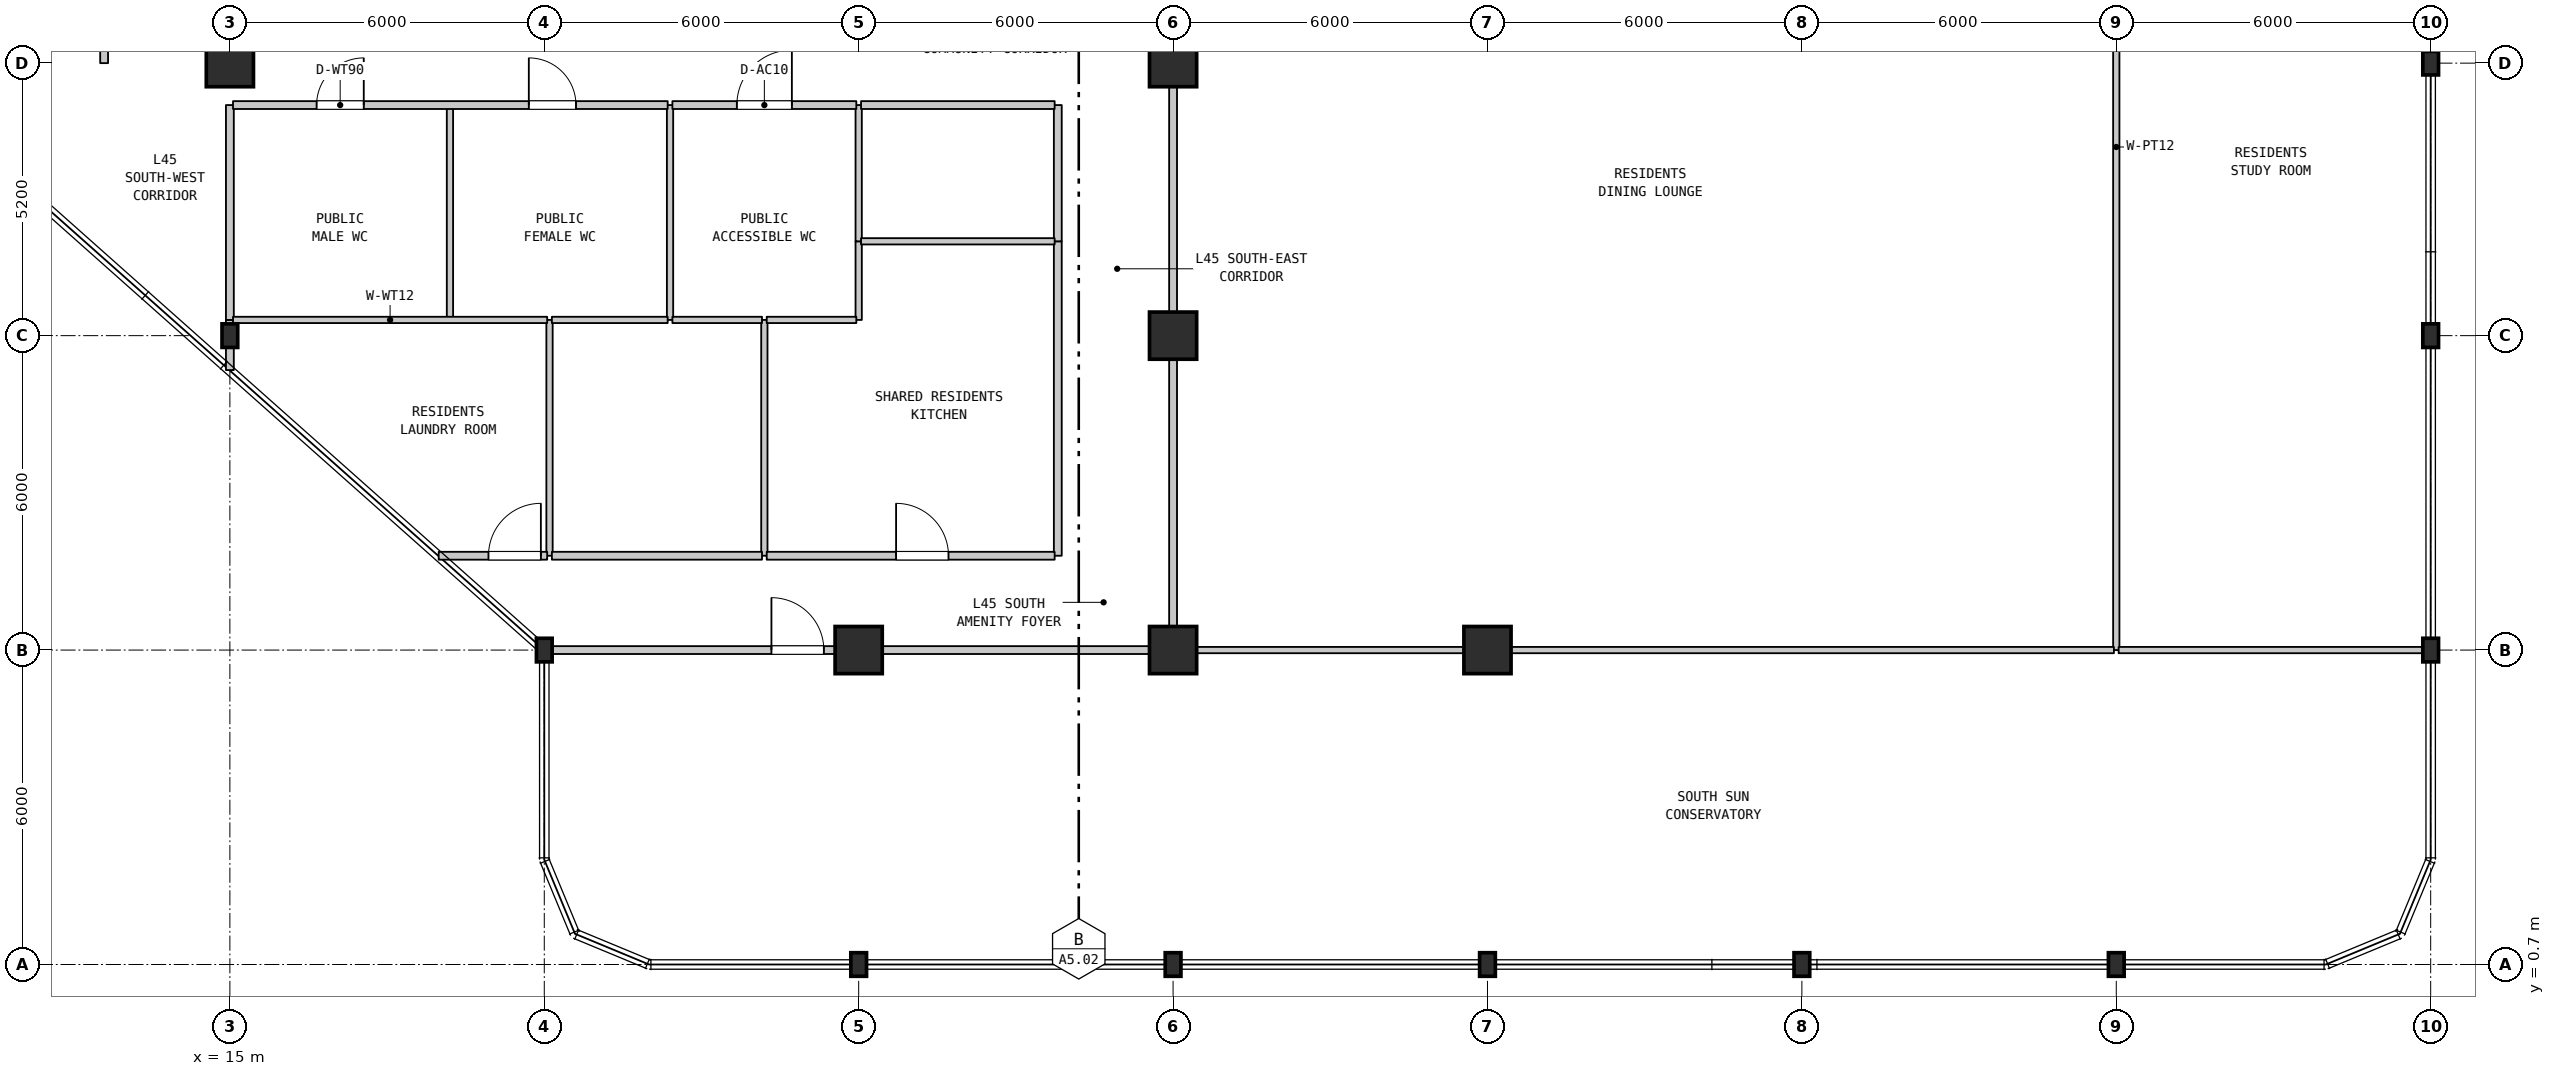
"""IFC4 building model, lengths in metres.
Left out: names, types, materials, properties, quantities, classifications, styles, units other than length and angle.
Written with IfcOpenShell. Run it as: python <this file> out.ifc"""

import sys

from ifc_helpers import new_model, si_unit, direction, frame, frame_2d, origin, origin_2d, place, context, subcontext, project, spatial, rectangle, i_section, extrude, element, fill, save


model = new_model("IFC4")
c1 = context("Model", 3, precision=1e-05, world=origin(), true_north=direction((0.0, 1.0)))
c2 = subcontext(c1, "Body", "Model", "MODEL_VIEW")
j1 = project(units=[si_unit("LENGTHUNIT", "METRE"), si_unit("PLANEANGLEUNIT", "RADIAN")], contexts=[c1])
p1 = place(None, origin())
s1 = spatial("IfcSite", under=j1, at=p1, CompositionType="ELEMENT")
p2 = place(p1, origin())
s2 = spatial("IfcBuilding", under=s1, at=p2, CompositionType="ELEMENT")
p3 = place(p2, frame((0.0, 0.0, 183.9)))
s3 = spatial("IfcBuildingStorey", under=s2, at=p3, CompositionType="ELEMENT", Elevation=183.9)
p4 = place(p3, frame((15.0, 12.7, 0.0), z_axis=(0.0, 0.0, 1.0), x_axis=(1.0, 0.0, 0.0)))
e1 = element("IfcColumn", 1, at=p4, inside=s3, PredefinedType="COLUMN", context=c2, shape_type="SweptSolid", body=[
    extrude(i_section(OverallWidth=0.3, OverallDepth=0.45, WebThickness=0.014, FlangeThickness=0.026, FilletRadius=0.027, at=origin_2d()), origin(), (0.0, 0.0, 1.0), 4.5),
])
p5 = place(p3, frame((15.0, 17.9, 0.0), z_axis=(0.0, 0.0, 1.0), x_axis=(1.0, 0.0, 0.0)))
e2 = element("IfcColumn", 2, at=p5, inside=s3, PredefinedType="COLUMN", context=c2, shape_type="SweptSolid", body=[
    extrude(rectangle(XDim=0.9, YDim=0.9, at=origin_2d()), origin(), (0.0, 0.0, 1.0), 4.5),
])
for number, where, z_axis, x_axis in (
    (3, (21.0, 6.7, 0.0), (0.0, 0.0, 1.0), (1.0, 0.0, 0.0)),
    (4, (27.0, 0.7, 0.0), (0.0, 0.0, 1.0), (1.0, 0.0, 0.0)),
):
    element("IfcColumn", number, at=place(p3, frame(where, z_axis=z_axis, x_axis=x_axis)), inside=s3, PredefinedType="COLUMN", context=c2, shape_type="SweptSolid", body=[
        extrude(i_section(OverallWidth=0.3, OverallDepth=0.45, WebThickness=0.014, FlangeThickness=0.026, FilletRadius=0.027, at=origin_2d()), origin(), (0.0, 0.0, 1.0), 4.5),
    ])
p6 = place(p3, frame((27.0, 6.7, 0.0), z_axis=(0.0, 0.0, 1.0), x_axis=(1.0, 0.0, 0.0)))
e5 = element("IfcColumn", 5, at=p6, inside=s3, PredefinedType="COLUMN", context=c2, shape_type="SweptSolid", body=[
    extrude(rectangle(XDim=0.9, YDim=0.9, at=origin_2d()), origin(), (0.0, 0.0, 1.0), 4.5),
])
p7 = place(p3, frame((33.0, 0.7, 0.0), z_axis=(0.0, 0.0, 1.0), x_axis=(1.0, 0.0, 0.0)))
e6 = element("IfcColumn", 6, at=p7, inside=s3, PredefinedType="COLUMN", context=c2, shape_type="SweptSolid", body=[
    extrude(i_section(OverallWidth=0.3, OverallDepth=0.45, WebThickness=0.014, FlangeThickness=0.026, FilletRadius=0.027, at=origin_2d()), origin(), (0.0, 0.0, 1.0), 4.5),
])
for number, where, z_axis, x_axis in (
    (7, (33.0, 6.7, 0.0), (0.0, 0.0, 1.0), (1.0, 0.0, 0.0)),
    (8, (33.0, 12.7, 0.0), (0.0, 0.0, 1.0), (1.0, 0.0, 0.0)),
    (9, (33.0, 17.9, 0.0), (0.0, 0.0, 1.0), (1.0, 0.0, 0.0)),
):
    element("IfcColumn", number, at=place(p3, frame(where, z_axis=z_axis, x_axis=x_axis)), inside=s3, PredefinedType="COLUMN", context=c2, shape_type="SweptSolid", body=[
        extrude(rectangle(XDim=0.9, YDim=0.9, at=origin_2d()), origin(), (0.0, 0.0, 1.0), 4.5),
    ])
p8 = place(p3, frame((39.0, 0.7, 0.0), z_axis=(0.0, 0.0, 1.0), x_axis=(1.0, 0.0, 0.0)))
e10 = element("IfcColumn", 10, at=p8, inside=s3, PredefinedType="COLUMN", context=c2, shape_type="SweptSolid", body=[
    extrude(i_section(OverallWidth=0.3, OverallDepth=0.45, WebThickness=0.014, FlangeThickness=0.026, FilletRadius=0.027, at=origin_2d()), origin(), (0.0, 0.0, 1.0), 4.5),
])
p9 = place(p3, frame((39.0, 6.7, 0.0), z_axis=(0.0, 0.0, 1.0), x_axis=(1.0, 0.0, 0.0)))
e11 = element("IfcColumn", 11, at=p9, inside=s3, PredefinedType="COLUMN", context=c2, shape_type="SweptSolid", body=[
    extrude(rectangle(XDim=0.9, YDim=0.9, at=origin_2d()), origin(), (0.0, 0.0, 1.0), 4.5),
])
for number, where, z_axis, x_axis in (
    (12, (45.0, 0.7, 0.0), (0.0, 0.0, 1.0), (1.0, 0.0, 0.0)),
    (13, (51.0, 0.7, 0.0), (0.0, 0.0, 1.0), (1.0, 0.0, 0.0)),
    (14, (57.0, 6.7, 0.0), (0.0, 0.0, 1.0), (1.0, 0.0, 0.0)),
    (15, (57.0, 12.7, 0.0), (0.0, 0.0, 1.0), (1.0, 0.0, 0.0)),
    (16, (57.0, 17.9, 0.0), (0.0, 0.0, 1.0), (1.0, 0.0, 0.0)),
):
    element("IfcColumn", number, at=place(p3, frame(where, z_axis=z_axis, x_axis=x_axis)), inside=s3, PredefinedType="COLUMN", context=c2, shape_type="SweptSolid", body=[
        extrude(i_section(OverallWidth=0.3, OverallDepth=0.45, WebThickness=0.014, FlangeThickness=0.026, FilletRadius=0.027, at=origin_2d()), origin(), (0.0, 0.0, 1.0), 4.5),
    ])
p10 = place(p3, frame((12.6, 17.9, 0.0), z_axis=(0.0, 0.0, 1.0), x_axis=(0.0, 1.0, 0.0)))
e17 = element("IfcWall", 17, at=p10, inside=s3, PredefinedType="STANDARD", context=c2, shape_type="SweptSolid", body=[
    extrude(rectangle(XDim=20.07, YDim=0.15, at=frame_2d((10.035, 0.0))), origin(), (0.0, 0.0, 1.0), 4.19),
])
p11 = place(p10, frame((9.1, 0.0, 0.0)))
e18 = element("IfcOpeningElement", 18, at=p11, cuts=e17, PredefinedType="OPENING", context=c2, shape_type="SweptSolid", body=[
    extrude(rectangle(XDim=1.0, YDim=2.15, at=frame_2d((0.5, 1.075))), frame((0.0, 0.085, 0.0), z_axis=(0.0, -1.0, 0.0), x_axis=(1.0, 0.0, 0.0)), (0.0, 0.0, 1.0), 0.17),
])
p12 = place(p3, frame((15.0, 12.043, 0.0), z_axis=(0.0, 0.0, 1.0), x_axis=(0.0, 1.0, 0.0)))
e19 = element("IfcWall", 19, at=p12, inside=s3, PredefinedType="STANDARD", context=c2, shape_type="SweptSolid", body=[
    extrude(rectangle(XDim=0.957, YDim=0.15, at=frame_2d((0.479, 0.0))), origin(), (0.0, 0.0, 1.0), 4.19),
])
p13 = place(p3, frame((15.0, 13.0, 0.0), z_axis=(0.0, 0.0, 1.0), x_axis=(0.0, 1.0, 0.0)))
e20 = element("IfcWall", 20, at=p13, inside=s3, PredefinedType="STANDARD", context=c2, shape_type="SweptSolid", body=[
    extrude(rectangle(XDim=4.1, YDim=0.15, at=frame_2d((2.05, 0.0))), origin(), (0.0, 0.0, 1.0), 3.79),
])
p14 = place(p3, frame((19.2, 13.0, 0.0), z_axis=(0.0, 0.0, 1.0), x_axis=(0.0, 1.0, 0.0)))
e21 = element("IfcWall", 21, at=p14, inside=s3, PredefinedType="PARTITIONING", context=c2, shape_type="SweptSolid", body=[
    extrude(rectangle(XDim=4.1, YDim=0.12, at=frame_2d((2.05, 0.0))), origin(), (0.0, 0.0, 1.0), 4.19),
])
p15 = place(p3, frame((21.1, 8.5, 0.0), z_axis=(0.0, 0.0, 1.0), x_axis=(0.0, 1.0, 0.0)))
e22 = element("IfcWall", 22, at=p15, inside=s3, PredefinedType="PARTITIONING", context=c2, shape_type="SweptSolid", body=[
    extrude(rectangle(XDim=4.5, YDim=0.12, at=frame_2d((2.25, 0.0))), origin(), (0.0, 0.0, 1.0), 4.19),
])
p16 = place(p3, frame((23.4, 13.0, 0.0), z_axis=(0.0, 0.0, 1.0), x_axis=(0.0, 1.0, 0.0)))
e23 = element("IfcWall", 23, at=p16, inside=s3, PredefinedType="PARTITIONING", context=c2, shape_type="SweptSolid", body=[
    extrude(rectangle(XDim=4.1, YDim=0.12, at=frame_2d((2.05, 0.0))), origin(), (0.0, 0.0, 1.0), 4.19),
])
p17 = place(p3, frame((25.2, 8.5, 0.0), z_axis=(0.0, 0.0, 1.0), x_axis=(0.0, 1.0, 0.0)))
e24 = element("IfcWall", 24, at=p17, inside=s3, PredefinedType="PARTITIONING", context=c2, shape_type="SweptSolid", body=[
    extrude(rectangle(XDim=4.5, YDim=0.12, at=frame_2d((2.25, 0.0))), origin(), (0.0, 0.0, 1.0), 4.19),
])
p18 = place(p3, frame((27.0, 13.0, 0.0), z_axis=(0.0, 0.0, 1.0), x_axis=(0.0, 1.0, 0.0)))
e25 = element("IfcWall", 25, at=p18, inside=s3, PredefinedType="PARTITIONING", context=c2, shape_type="SweptSolid", body=[
    extrude(rectangle(XDim=1.5, YDim=0.12, at=frame_2d((0.75, 0.0))), origin(), (0.0, 0.0, 1.0), 4.19),
])
p19 = place(p3, frame((27.0, 14.5, 0.0), z_axis=(0.0, 0.0, 1.0), x_axis=(0.0, 1.0, 0.0)))
e26 = element("IfcWall", 26, at=p19, inside=s3, PredefinedType="PARTITIONING", context=c2, shape_type="SweptSolid", body=[
    extrude(rectangle(XDim=2.6, YDim=0.12, at=frame_2d((1.3, 0.0))), origin(), (0.0, 0.0, 1.0), 4.19),
])
p20 = place(p3, frame((30.8, 8.5, 0.0), z_axis=(0.0, 0.0, 1.0), x_axis=(0.0, 1.0, 0.0)))
e27 = element("IfcWall", 27, at=p20, inside=s3, PredefinedType="STANDARD", context=c2, shape_type="SweptSolid", body=[
    extrude(rectangle(XDim=6.0, YDim=0.15, at=frame_2d((3.0, 0.0))), origin(), (0.0, 0.0, 1.0), 4.19),
])
p21 = place(p3, frame((30.8, 14.5, 0.0), z_axis=(0.0, 0.0, 1.0), x_axis=(0.0, 1.0, 0.0)))
e28 = element("IfcWall", 28, at=p21, inside=s3, PredefinedType="STANDARD", context=c2, shape_type="SweptSolid", body=[
    extrude(rectangle(XDim=2.6, YDim=0.15, at=frame_2d((1.3, 0.0))), origin(), (0.0, 0.0, 1.0), 4.19),
])
p22 = place(p3, frame((33.0, 6.7, 0.0), z_axis=(0.0, 0.0, 1.0), x_axis=(0.0, 1.0, 0.0)))
e29 = element("IfcWall", 29, at=p22, inside=s3, PredefinedType="STANDARD", context=c2, shape_type="SweptSolid", body=[
    extrude(rectangle(XDim=19.2, YDim=0.15, at=frame_2d((9.6, 0.0))), origin(), (0.0, 0.0, 1.0), 3.79),
])
p23 = place(p3, frame((51.0, 6.7, 0.0), z_axis=(0.0, 0.0, 1.0), x_axis=(0.0, 1.0, 0.0)))
e30 = element("IfcWall", 30, at=p23, inside=s3, PredefinedType="PARTITIONING", context=c2, shape_type="SweptSolid", body=[
    extrude(rectangle(XDim=19.2, YDim=0.12, at=frame_2d((9.6, 0.0))), origin(), (0.0, 0.0, 1.0), 4.19),
])
p24 = place(p3, frame((21.01, 6.7, 0.0), z_axis=(0.0, 0.0, 1.0), x_axis=(1.0, 0.0, 0.0)))
e31 = element("IfcWall", 31, at=p24, inside=s3, PredefinedType="STANDARD", context=c2, shape_type="SweptSolid", body=[
    extrude(rectangle(XDim=11.93, YDim=0.15, at=frame_2d((5.965, 0.0))), origin(), (0.0, 0.0, 1.0), 3.89),
])
p25 = place(p24, frame((4.325, 0.0, 0.0)))
e32 = element("IfcOpeningElement", 32, at=p25, cuts=e31, PredefinedType="OPENING", context=c2, shape_type="SweptSolid", body=[
    extrude(rectangle(XDim=1.0, YDim=2.15, at=frame_2d((0.5, 1.075))), frame((0.0, 0.085, 0.0), z_axis=(0.0, -1.0, 0.0), x_axis=(1.0, 0.0, 0.0)), (0.0, 0.0, 1.0), 0.17),
])
p26 = place(p3, frame((33.06, 6.7, 0.0), z_axis=(0.0, 0.0, 1.0), x_axis=(1.0, 0.0, 0.0)))
e33 = element("IfcWall", 33, at=p26, inside=s3, PredefinedType="PARTITIONING", context=c2, shape_type="SweptSolid", body=[
    extrude(rectangle(XDim=5.94, YDim=0.12, at=frame_2d((2.97, 0.0))), origin(), (0.0, 0.0, 1.0), 3.89),
])
p27 = place(p3, frame((51.045, 6.7, 0.0), z_axis=(0.0, 0.0, 1.0), x_axis=(1.0, 0.0, 0.0)))
e34 = element("IfcWall", 34, at=p27, inside=s3, PredefinedType="PARTITIONING", context=c2, shape_type="SweptSolid", body=[
    extrude(rectangle(XDim=5.945, YDim=0.12, at=frame_2d((2.973, 0.0))), origin(), (0.0, 0.0, 1.0), 3.59),
])
p28 = place(p3, frame((18.985, 8.5, 0.0), z_axis=(0.0, 0.0, 1.0), x_axis=(1.0, 0.0, 0.0)))
e35 = element("IfcWall", 35, at=p28, inside=s3, PredefinedType="STANDARD", context=c2, shape_type="SweptSolid", body=[
    extrude(rectangle(XDim=2.07, YDim=0.15, at=frame_2d((1.035, 0.0))), origin(), (0.0, 0.0, 1.0), 4.19),
])
p29 = place(p28, frame((0.95, 0.0, 0.0)))
e36 = element("IfcOpeningElement", 36, at=p29, cuts=e35, PredefinedType="OPENING", context=c2, shape_type="SweptSolid", body=[
    extrude(rectangle(XDim=1.0, YDim=2.15, at=frame_2d((0.5, 1.075))), frame((0.0, 0.085, 0.0), z_axis=(0.0, -1.0, 0.0), x_axis=(1.0, 0.0, 0.0)), (0.0, 0.0, 1.0), 0.17),
])
p30 = place(p3, frame((21.145, 8.5, 0.0), z_axis=(0.0, 0.0, 1.0), x_axis=(1.0, 0.0, 0.0)))
e37 = element("IfcWall", 37, at=p30, inside=s3, PredefinedType="STANDARD", context=c2, shape_type="SweptSolid", body=[
    extrude(rectangle(XDim=4.01, YDim=0.15, at=frame_2d((2.005, 0.0))), origin(), (0.0, 0.0, 1.0), 4.19),
])
p31 = place(p3, frame((25.245, 8.5, 0.0), z_axis=(0.0, 0.0, 1.0), x_axis=(1.0, 0.0, 0.0)))
e38 = element("IfcWall", 38, at=p31, inside=s3, PredefinedType="STANDARD", context=c2, shape_type="SweptSolid", body=[
    extrude(rectangle(XDim=5.495, YDim=0.15, at=frame_2d((2.748, 0.0))), origin(), (0.0, 0.0, 1.0), 4.19),
])
p32 = place(p31, frame((2.469, 0.0, 0.0)))
e39 = element("IfcOpeningElement", 39, at=p32, cuts=e38, PredefinedType="OPENING", context=c2, shape_type="SweptSolid", body=[
    extrude(rectangle(XDim=1.0, YDim=2.15, at=frame_2d((0.5, 1.075))), frame((0.0, 0.085, 0.0), z_axis=(0.0, -1.0, 0.0), x_axis=(1.0, 0.0, 0.0)), (0.0, 0.0, 1.0), 0.17),
])
p33 = place(p3, frame((15.06, 13.0, 0.0), z_axis=(0.0, 0.0, 1.0), x_axis=(1.0, 0.0, 0.0)))
e40 = element("IfcWall", 40, at=p33, inside=s3, PredefinedType="PARTITIONING", context=c2, shape_type="SweptSolid", body=[
    extrude(rectangle(XDim=5.995, YDim=0.12, at=frame_2d((2.998, 0.0))), origin(), (0.0, 0.0, 1.0), 4.19),
])
p34 = place(p3, frame((21.145, 13.0, 0.0), z_axis=(0.0, 0.0, 1.0), x_axis=(1.0, 0.0, 0.0)))
e41 = element("IfcWall", 41, at=p34, inside=s3, PredefinedType="PARTITIONING", context=c2, shape_type="SweptSolid", body=[
    extrude(rectangle(XDim=2.21, YDim=0.12, at=frame_2d((1.105, 0.0))), origin(), (0.0, 0.0, 1.0), 4.19),
])
for number, where, z_axis, x_axis in (
    (42, (23.445, 13.0, 0.0), (0.0, 0.0, 1.0), (1.0, 0.0, 0.0)),
    (43, (25.245, 13.0, 0.0), (0.0, 0.0, 1.0), (1.0, 0.0, 0.0)),
):
    element("IfcWall", number, at=place(p3, frame(where, z_axis=z_axis, x_axis=x_axis)), inside=s3, PredefinedType="PARTITIONING", context=c2, shape_type="SweptSolid", body=[
        extrude(rectangle(XDim=1.71, YDim=0.12, at=frame_2d((0.855, 0.0))), origin(), (0.0, 0.0, 1.0), 4.19),
    ])
p35 = place(p3, frame((27.045, 14.5, 0.0), z_axis=(0.0, 0.0, 1.0), x_axis=(1.0, 0.0, 0.0)))
e44 = element("IfcWall", 44, at=p35, inside=s3, PredefinedType="PARTITIONING", context=c2, shape_type="SweptSolid", body=[
    extrude(rectangle(XDim=3.695, YDim=0.12, at=frame_2d((1.848, 0.0))), origin(), (0.0, 0.0, 1.0), 4.19),
])
p36 = place(p3, frame((15.06, 17.1, 0.0), z_axis=(0.0, 0.0, 1.0), x_axis=(1.0, 0.0, 0.0)))
e45 = element("IfcWall", 45, at=p36, inside=s3, PredefinedType="STANDARD", context=c2, shape_type="SweptSolid", body=[
    extrude(rectangle(XDim=8.295, YDim=0.15, at=frame_2d((4.147, 0.0))), origin(), (0.0, 0.0, 1.0), 4.19),
])
p37 = place(p36, frame((1.595, 0.0, 0.0)))
e46 = element("IfcOpeningElement", 46, at=p37, cuts=e45, PredefinedType="OPENING", context=c2, shape_type="SweptSolid", body=[
    extrude(rectangle(XDim=0.9, YDim=2.1, at=frame_2d((0.45, 1.05))), frame((0.0, 0.085, 0.0), z_axis=(0.0, -1.0, 0.0), x_axis=(1.0, 0.0, 0.0)), (0.0, 0.0, 1.0), 0.17),
])
p38 = place(p36, frame((5.645, 0.0, 0.0)))
e47 = element("IfcOpeningElement", 47, at=p38, cuts=e45, PredefinedType="OPENING", context=c2, shape_type="SweptSolid", body=[
    extrude(rectangle(XDim=0.9, YDim=2.1, at=frame_2d((0.45, 1.05))), frame((0.0, 0.085, 0.0), z_axis=(0.0, -1.0, 0.0), x_axis=(1.0, 0.0, 0.0)), (0.0, 0.0, 1.0), 0.17),
])
p39 = place(p3, frame((23.445, 17.1, 0.0), z_axis=(0.0, 0.0, 1.0), x_axis=(1.0, 0.0, 0.0)))
e48 = element("IfcWall", 48, at=p39, inside=s3, PredefinedType="STANDARD", context=c2, shape_type="SweptSolid", body=[
    extrude(rectangle(XDim=3.51, YDim=0.15, at=frame_2d((1.755, 0.0))), origin(), (0.0, 0.0, 1.0), 4.19),
])
p40 = place(p39, frame((1.23, 0.0, 0.0)))
e49 = element("IfcOpeningElement", 49, at=p40, cuts=e48, PredefinedType="OPENING", context=c2, shape_type="SweptSolid", body=[
    extrude(rectangle(XDim=1.05, YDim=2.15, at=frame_2d((0.525, 1.075))), frame((0.0, 0.085, 0.0), z_axis=(0.0, -1.0, 0.0), x_axis=(1.0, 0.0, 0.0)), (0.0, 0.0, 1.0), 0.17),
])
p41 = place(p3, frame((27.045, 17.1, 0.0), z_axis=(0.0, 0.0, 1.0), x_axis=(1.0, 0.0, 0.0)))
e50 = element("IfcWall", 50, at=p41, inside=s3, PredefinedType="STANDARD", context=c2, shape_type="SweptSolid", body=[
    extrude(rectangle(XDim=3.695, YDim=0.15, at=frame_2d((1.848, 0.0))), origin(), (0.0, 0.0, 1.0), 4.19),
])
p42 = place(p3, frame((39.0, 6.7, 0.0), z_axis=(0.0, 0.0, 1.0), x_axis=(1.0, 0.0, 0.0)))
e51 = element("IfcWall", 51, at=p42, inside=s3, PredefinedType="PARTITIONING", context=c2, shape_type="SweptSolid", body=[
    extrude(rectangle(XDim=11.955, YDim=0.12, at=frame_2d((5.978, 0.0))), origin(), (0.0, 0.0, 1.0), 3.59),
])
p43 = place(p25, origin())
e52 = element("IfcDoor", 52, at=p43, inside=s3, OperationType="SINGLE_SWING_LEFT", PredefinedType="DOOR", context=c2, shape_type="SweptSolid", body=[
    extrude(rectangle(XDim=1.0, YDim=2.15, at=frame_2d((0.5, 1.075))), frame((0.0, 0.025, 0.0), z_axis=(0.0, -1.0, 0.0), x_axis=(1.0, 0.0, 0.0)), (0.0, 0.0, 1.0), 0.05),
])
fill(e32, e52)
p44 = place(p29, origin())
e53 = element("IfcDoor", 53, at=p44, inside=s3, OperationType="SINGLE_SWING_RIGHT", PredefinedType="DOOR", context=c2, shape_type="SweptSolid", body=[
    extrude(rectangle(XDim=1.0, YDim=2.15, at=frame_2d((0.5, 1.075))), frame((0.0, 0.025, 0.0), z_axis=(0.0, -1.0, 0.0), x_axis=(1.0, 0.0, 0.0)), (0.0, 0.0, 1.0), 0.05),
])
fill(e36, e53)
p45 = place(p32, origin())
e54 = element("IfcDoor", 54, at=p45, inside=s3, OperationType="SINGLE_SWING_LEFT", PredefinedType="DOOR", context=c2, shape_type="SweptSolid", body=[
    extrude(rectangle(XDim=1.0, YDim=2.15, at=frame_2d((0.5, 1.075))), frame((0.0, 0.025, 0.0), z_axis=(0.0, -1.0, 0.0), x_axis=(1.0, 0.0, 0.0)), (0.0, 0.0, 1.0), 0.05),
])
fill(e39, e54)
p46 = place(p37, origin())
e55 = element("IfcDoor", 55, at=p46, inside=s3, OperationType="SINGLE_SWING_RIGHT", PredefinedType="DOOR", context=c2, shape_type="SweptSolid", body=[
    extrude(rectangle(XDim=0.9, YDim=2.1, at=frame_2d((0.45, 1.05))), frame((0.0, 0.025, 0.0), z_axis=(0.0, -1.0, 0.0), x_axis=(1.0, 0.0, 0.0)), (0.0, 0.0, 1.0), 0.05),
])
fill(e46, e55)
p47 = place(p38, origin())
e56 = element("IfcDoor", 56, at=p47, inside=s3, OperationType="SINGLE_SWING_LEFT", PredefinedType="DOOR", context=c2, shape_type="SweptSolid", body=[
    extrude(rectangle(XDim=0.9, YDim=2.1, at=frame_2d((0.45, 1.05))), frame((0.0, 0.025, 0.0), z_axis=(0.0, -1.0, 0.0), x_axis=(1.0, 0.0, 0.0)), (0.0, 0.0, 1.0), 0.05),
])
fill(e47, e56)
p48 = place(p40, origin())
e57 = element("IfcDoor", 57, at=p48, inside=s3, OperationType="SINGLE_SWING_RIGHT", PredefinedType="DOOR", context=c2, shape_type="SweptSolid", body=[
    extrude(rectangle(XDim=1.05, YDim=2.15, at=frame_2d((0.525, 1.075))), frame((0.0, 0.025, 0.0), z_axis=(0.0, -1.0, 0.0), x_axis=(1.0, 0.0, 0.0)), (0.0, 0.0, 1.0), 0.05),
])
fill(e49, e57)
save(model, sys.argv[1])
